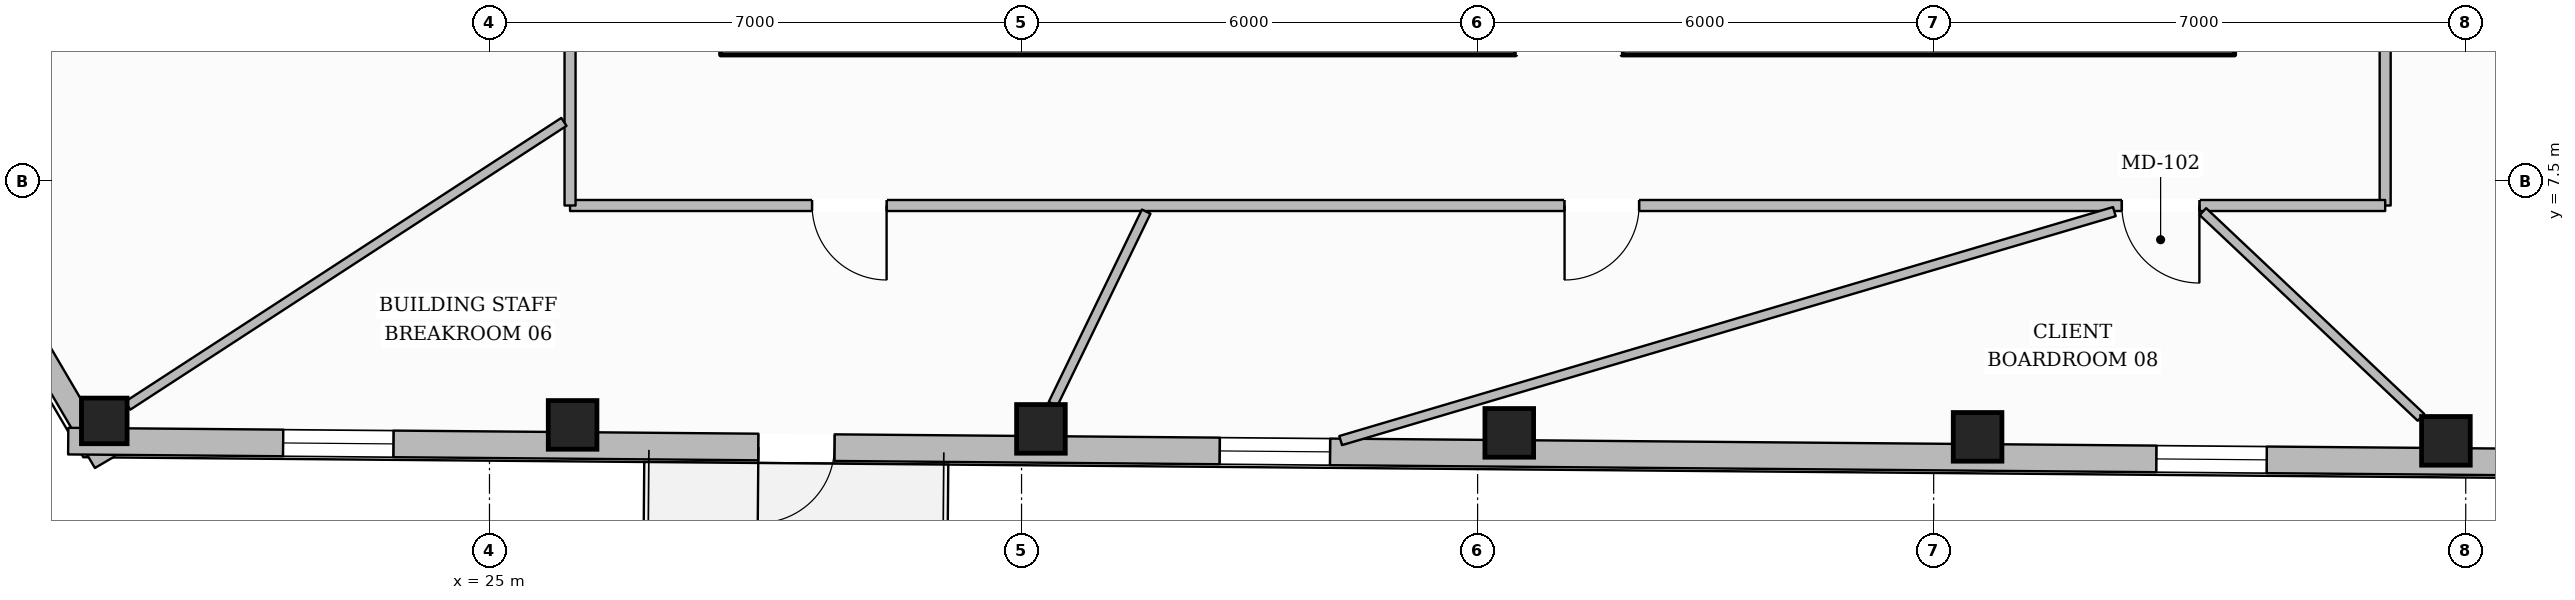
"""IFC4 building model, lengths in metres.
Left out: names, types, materials, properties, quantities, classifications, styles, units other than length and angle.
Written with IfcOpenShell. Run it as: python <this file> out.ifc"""

import sys

from ifc_helpers import new_model, si_unit, direction, frame, frame_2d, origin, origin_2d, place, context, subcontext, project, spatial, rectangle, hollow_rectangle, extrude, element, fill, save


model = new_model("IFC4")
c1 = context("Model", 3, precision=1e-05, world=origin(), true_north=direction((0.0, 1.0)))
c2 = subcontext(c1, "Body", "Model", "MODEL_VIEW")
j1 = project(units=[si_unit("LENGTHUNIT", "METRE"), si_unit("PLANEANGLEUNIT", "RADIAN")], contexts=[c1])
p1 = place(None, origin())
s1 = spatial("IfcSite", under=j1, at=p1, CompositionType="ELEMENT")
p2 = place(p1, origin())
s2 = spatial("IfcBuilding", under=s1, at=p2, CompositionType="ELEMENT")
p3 = place(p2, frame((0.0, 0.0, 191.95)))
s3 = spatial("IfcBuildingStorey", under=s2, at=p3, CompositionType="ELEMENT", Elevation=191.95)
p4 = place(p3, frame((28.04, 9.38, 0.0), z_axis=(0.0, 0.0, 1.0), x_axis=(1.0, 0.0, 0.0)))
e1 = element("IfcWall", 1, at=p4, inside=s3, PredefinedType="SOLIDWALL", context=c2, shape_type="SweptSolid", body=[
    extrude(rectangle(XDim=19.92, YDim=0.44, at=frame_2d((9.96, 0.0))), origin(), (0.0, 0.0, 1.0), 3.6),
])
p5 = place(p4, frame((10.46, 0.0, 0.0)))
e2 = element("IfcOpeningElement", 2, at=p5, cuts=e1, PredefinedType="OPENING", context=c2, shape_type="SweptSolid", body=[
    extrude(rectangle(XDim=1.4, YDim=2.2, at=frame_2d((0.7, 1.1))), frame((0.0, 0.23, 0.0), z_axis=(0.0, -1.0, 0.0), x_axis=(1.0, 0.0, 0.0)), (0.0, 0.0, 1.0), 0.46),
])
p6 = place(p3, frame((19.932, 4.346, 0.0), z_axis=(0.0, 0.0, 1.0), x_axis=(1.0, 0.0, 0.0)))
e3 = element("IfcColumn", 3, at=p6, inside=s3, PredefinedType="COLUMN", context=c2, shape_type="SweptSolid", body=[
    extrude(hollow_rectangle(XDim=0.6, YDim=0.6, WallThickness=0.028, at=origin_2d()), origin(), (0.0, 0.0, 1.0), 3.6),
])
for number, where, z_axis, x_axis in (
    (4, (26.094, 4.294, 0.0), (0.0, 0.0, 1.0), (1.0, 0.0, 0.0)),
    (5, (32.255, 4.241, 0.0), (0.0, 0.0, 1.0), (1.0, 0.0, 0.0)),
    (6, (38.417, 4.189, 0.0), (0.0, 0.0, 1.0), (1.0, 0.0, 0.0)),
    (7, (44.578, 4.136, 0.0), (0.0, 0.0, 1.0), (1.0, 0.0, 0.0)),
    (8, (50.739, 4.084, 0.0), (0.0, 0.0, 1.0), (1.0, 0.0, 0.0)),
):
    element("IfcColumn", number, at=place(p3, frame(where, z_axis=z_axis, x_axis=x_axis)), inside=s3, PredefinedType="COLUMN", context=c2, shape_type="SweptSolid", body=[
        extrude(hollow_rectangle(XDim=0.64, YDim=0.64, WallThickness=0.028, at=origin_2d()), origin(), (0.0, 0.0, 1.0), 3.6),
    ])
p7 = place(p3, frame((19.938, 3.802, 0.0), z_axis=(0.0, 0.0, 1.0), x_axis=(-0.506326456483, 0.862341880849, 0.0)))
e9 = element("IfcWall", 9, at=p7, inside=s3, PredefinedType="STANDARD", context=c2, shape_type="SweptSolid", body=[
    extrude(rectangle(XDim=9.877, YDim=0.3, at=frame_2d((4.938, 0.0))), origin(), (0.0, 0.0, 1.0), 3.132),
])
p8 = place(p7, frame((4.414, 0.0, 0.65)))
e10 = element("IfcOpeningElement", 10, at=p8, cuts=e9, PredefinedType="OPENING", context=c2, shape_type="SweptSolid", body=[
    extrude(rectangle(XDim=1.05, YDim=1.7, at=frame_2d((0.525, 0.85))), frame((0.0, 0.16, 0.0), z_axis=(0.0, -1.0, 0.0), x_axis=(1.0, 0.0, 0.0)), (0.0, 0.0, 1.0), 0.32),
])
p9 = place(p3, frame((57.379, 3.757, 0.0), z_axis=(0.0, 0.0, 1.0), x_axis=(-0.999963726544, 0.008517370208, 0.0)))
e11 = element("IfcWall", 11, at=p9, inside=s3, PredefinedType="STANDARD", context=c2, shape_type="SweptSolid", body=[
    extrude(rectangle(XDim=37.922, YDim=0.35, at=frame_2d((18.961, 0.0))), origin(), (0.0, 0.0, 1.0), 3.132),
])
p10 = place(p9, frame((27.842, 0.0, 0.0)))
e12 = element("IfcOpeningElement", 12, at=p10, cuts=e11, PredefinedType="OPENING", context=c2, shape_type="SweptSolid", body=[
    extrude(rectangle(XDim=1.0, YDim=2.2, at=frame_2d((0.5, 1.1))), frame((0.0, 0.185, 0.0), z_axis=(0.0, -1.0, 0.0), x_axis=(1.0, 0.0, 0.0)), (0.0, 0.0, 1.0), 0.37),
])
p11 = place(p9, frame((33.644, 0.0, 0.65)))
e13 = element("IfcOpeningElement", 13, at=p11, cuts=e11, PredefinedType="OPENING", context=c2, shape_type="SweptSolid", body=[
    extrude(rectangle(XDim=1.45, YDim=1.75, at=frame_2d((0.725, 0.875))), frame((0.0, 0.185, 0.0), z_axis=(0.0, -1.0, 0.0), x_axis=(1.0, 0.0, 0.0)), (0.0, 0.0, 1.0), 0.37),
])
p12 = place(p9, frame((21.321, 0.0, 0.65)))
e14 = element("IfcOpeningElement", 14, at=p12, cuts=e11, PredefinedType="OPENING", context=c2, shape_type="SweptSolid", body=[
    extrude(rectangle(XDim=1.45, YDim=1.75, at=frame_2d((0.725, 0.875))), frame((0.0, 0.185, 0.0), z_axis=(0.0, -1.0, 0.0), x_axis=(1.0, 0.0, 0.0)), (0.0, 0.0, 1.0), 0.37),
])
p13 = place(p9, frame((8.998, 0.0, 0.65)))
e15 = element("IfcOpeningElement", 15, at=p13, cuts=e11, PredefinedType="OPENING", context=c2, shape_type="SweptSolid", body=[
    extrude(rectangle(XDim=1.45, YDim=1.75, at=frame_2d((0.725, 0.875))), frame((0.0, 0.185, 0.0), z_axis=(0.0, -1.0, 0.0), x_axis=(1.0, 0.0, 0.0)), (0.0, 0.0, 1.0), 0.37),
])
p14 = place(p9, frame((2.836, 0.0, 0.65)))
e16 = element("IfcOpeningElement", 16, at=p14, cuts=e11, PredefinedType="OPENING", context=c2, shape_type="SweptSolid", body=[
    extrude(rectangle(XDim=1.45, YDim=1.75, at=frame_2d((0.725, 0.875))), frame((0.0, 0.185, 0.0), z_axis=(0.0, -1.0, 0.0), x_axis=(1.0, 0.0, 0.0)), (0.0, 0.0, 1.0), 0.37),
])
p15 = place(p3, frame((49.94, 15.1, 0.0), z_axis=(0.0, 0.0, 1.0), x_axis=(0.0, -1.0, 0.0)))
e17 = element("IfcWall", 17, at=p15, inside=s3, PredefinedType="PARTITIONING", context=c2, shape_type="SweptSolid", body=[
    extrude(rectangle(XDim=7.92, YDim=0.145, at=frame_2d((3.96, 0.0))), origin(), (0.0, 0.0, 1.0), 3.6),
])
p16 = place(p15, frame((3.26, 0.0, 0.0)))
e18 = element("IfcOpeningElement", 18, at=p16, cuts=e17, PredefinedType="OPENING", context=c2, shape_type="SweptSolid", body=[
    extrude(rectangle(XDim=1.4, YDim=2.2, at=frame_2d((0.7, 1.1))), frame((0.0, 0.083, 0.0), z_axis=(0.0, -1.0, 0.0), x_axis=(1.0, 0.0, 0.0)), (0.0, 0.0, 1.0), 0.165),
])
p17 = place(p3, frame((49.94, 7.18, 0.0), z_axis=(0.0, 0.0, 1.0), x_axis=(-1.0, 0.0, 0.0)))
e19 = element("IfcWall", 19, at=p17, inside=s3, PredefinedType="PARTITIONING", context=c2, shape_type="SweptSolid", body=[
    extrude(rectangle(XDim=23.88, YDim=0.145, at=frame_2d((11.94, 0.0))), origin(), (0.0, 0.0, 1.0), 3.6),
])
p18 = place(p17, frame((19.715, 0.0, 0.0)))
e20 = element("IfcOpeningElement", 20, at=p18, cuts=e19, PredefinedType="OPENING", context=c2, shape_type="SweptSolid", body=[
    extrude(rectangle(XDim=0.98, YDim=2.15, at=frame_2d((0.49, 1.075))), frame((0.0, 0.083, 0.0), z_axis=(0.0, -1.0, 0.0), x_axis=(1.0, 0.0, 0.0)), (0.0, 0.0, 1.0), 0.165),
])
p19 = place(p17, frame((9.816, 0.0, 0.0)))
e21 = element("IfcOpeningElement", 21, at=p19, cuts=e19, PredefinedType="OPENING", context=c2, shape_type="SweptSolid", body=[
    extrude(rectangle(XDim=0.98, YDim=2.15, at=frame_2d((0.49, 1.075))), frame((0.0, 0.083, 0.0), z_axis=(0.0, -1.0, 0.0), x_axis=(1.0, 0.0, 0.0)), (0.0, 0.0, 1.0), 0.165),
])
p20 = place(p17, frame((2.444, 0.0, 0.0)))
e22 = element("IfcOpeningElement", 22, at=p20, cuts=e19, PredefinedType="OPENING", context=c2, shape_type="SweptSolid", body=[
    extrude(rectangle(XDim=1.02, YDim=2.15, at=frame_2d((0.51, 1.075))), frame((0.0, 0.083, 0.0), z_axis=(0.0, -1.0, 0.0), x_axis=(1.0, 0.0, 0.0)), (0.0, 0.0, 1.0), 0.165),
])
p21 = place(p3, frame((26.06, 7.18, 0.0), z_axis=(0.0, 0.0, 1.0), x_axis=(0.0, 1.0, 0.0)))
e23 = element("IfcWall", 23, at=p21, inside=s3, PredefinedType="PARTITIONING", context=c2, shape_type="SweptSolid", body=[
    extrude(rectangle(XDim=4.97, YDim=0.145, at=frame_2d((2.485, 0.0))), origin(), (0.0, 0.0, 1.0), 3.6),
])
p22 = place(p21, frame((2.273, 0.0, 0.0)))
e24 = element("IfcOpeningElement", 24, at=p22, cuts=e23, PredefinedType="OPENING", context=c2, shape_type="SweptSolid", body=[
    extrude(rectangle(XDim=1.4, YDim=2.2, at=frame_2d((0.7, 1.1))), frame((0.0, 0.083, 0.0), z_axis=(0.0, -1.0, 0.0), x_axis=(1.0, 0.0, 0.0)), (0.0, 0.0, 1.0), 0.165),
])
p23 = place(p3, frame((25.979, 8.28, 0.0), z_axis=(0.0, 0.0, 1.0), x_axis=(-0.838234999643, -0.545309164946, 0.0)))
e25 = element("IfcWall", 25, at=p23, inside=s3, PredefinedType="PARTITIONING", context=c2, shape_type="SweptSolid", body=[
    extrude(rectangle(XDim=6.847, YDim=0.125, at=frame_2d((3.423, 0.0))), origin(), (0.0, 0.0, 1.0), 3.141),
])
p24 = place(p3, frame((33.64, 7.1, 0.0), z_axis=(0.0, 0.0, 1.0), x_axis=(-0.435960320496, -0.899965887661, 0.0)))
e26 = element("IfcWall", 26, at=p24, inside=s3, PredefinedType="PARTITIONING", context=c2, shape_type="SweptSolid", body=[
    extrude(rectangle(XDim=2.812, YDim=0.125, at=frame_2d((1.406, 0.0))), origin(), (0.0, 0.0, 1.0), 3.6),
])
p25 = place(p3, frame((47.542, 7.1, 0.0), z_axis=(0.0, 0.0, 1.0), x_axis=(0.727449032528, -0.68616171933, 0.0)))
e27 = element("IfcWall", 27, at=p25, inside=s3, PredefinedType="PARTITIONING", context=c2, shape_type="SweptSolid", body=[
    extrude(rectangle(XDim=3.944, YDim=0.125, at=frame_2d((1.972, 0.0))), origin(), (0.0, 0.0, 1.0), 3.6),
])
p26 = place(p3, frame((36.198, 4.088, 0.0), z_axis=(0.0, 0.0, 1.0), x_axis=(0.958899447114, 0.283746101867, 0.0)))
e28 = element("IfcWall", 28, at=p26, inside=s3, PredefinedType="PARTITIONING", context=c2, shape_type="SweptSolid", body=[
    extrude(rectangle(XDim=10.615, YDim=0.125, at=frame_2d((5.308, 0.0))), origin(), (0.0, 0.0, 1.0), 3.135),
])
p27 = place(p10, origin())
e29 = element("IfcDoor", 29, at=p27, inside=s3, OperationType="SINGLE_SWING_RIGHT", PredefinedType="DOOR", context=c2, shape_type="SweptSolid", body=[
    extrude(rectangle(XDim=1.0, YDim=2.2, at=frame_2d((0.5, 1.1))), frame((0.0, 0.025, 0.0), z_axis=(0.0, -1.0, 0.0), x_axis=(1.0, 0.0, 0.0)), (0.0, 0.0, 1.0), 0.05),
])
fill(e12, e29)
p28 = place(p11, origin())
e30 = element("IfcWindow", 30, at=p28, inside=s3, PartitioningType="SINGLE_PANEL", PredefinedType="WINDOW", context=c2, shape_type="SweptSolid", body=[
    extrude(rectangle(XDim=1.45, YDim=1.75, at=frame_2d((0.725, 0.875))), frame((0.0, 0.03, 0.0), z_axis=(0.0, -1.0, 0.0), x_axis=(1.0, 0.0, 0.0)), (0.0, 0.0, 1.0), 0.06),
])
fill(e13, e30)
p29 = place(p12, origin())
e31 = element("IfcWindow", 31, at=p29, inside=s3, PartitioningType="SINGLE_PANEL", PredefinedType="WINDOW", context=c2, shape_type="SweptSolid", body=[
    extrude(rectangle(XDim=1.45, YDim=1.75, at=frame_2d((0.725, 0.875))), frame((0.0, 0.03, 0.0), z_axis=(0.0, -1.0, 0.0), x_axis=(1.0, 0.0, 0.0)), (0.0, 0.0, 1.0), 0.06),
])
fill(e14, e31)
p30 = place(p13, origin())
e32 = element("IfcWindow", 32, at=p30, inside=s3, PartitioningType="SINGLE_PANEL", PredefinedType="WINDOW", context=c2, shape_type="SweptSolid", body=[
    extrude(rectangle(XDim=1.45, YDim=1.75, at=frame_2d((0.725, 0.875))), frame((0.0, 0.03, 0.0), z_axis=(0.0, -1.0, 0.0), x_axis=(1.0, 0.0, 0.0)), (0.0, 0.0, 1.0), 0.06),
])
fill(e15, e32)
p31 = place(p18, origin())
e33 = element("IfcDoor", 33, at=p31, inside=s3, OperationType="SINGLE_SWING_LEFT", PredefinedType="DOOR", context=c2, shape_type="SweptSolid", body=[
    extrude(rectangle(XDim=0.98, YDim=2.15, at=frame_2d((0.49, 1.075))), frame((0.0, 0.025, 0.0), z_axis=(0.0, -1.0, 0.0), x_axis=(1.0, 0.0, 0.0)), (0.0, 0.0, 1.0), 0.05),
])
fill(e20, e33)
p32 = place(p19, origin())
e34 = element("IfcDoor", 34, at=p32, inside=s3, OperationType="SINGLE_SWING_RIGHT", PredefinedType="DOOR", context=c2, shape_type="SweptSolid", body=[
    extrude(rectangle(XDim=0.98, YDim=2.15, at=frame_2d((0.49, 1.075))), frame((0.0, 0.025, 0.0), z_axis=(0.0, -1.0, 0.0), x_axis=(1.0, 0.0, 0.0)), (0.0, 0.0, 1.0), 0.05),
])
fill(e21, e34)
p33 = place(p20, origin())
e35 = element("IfcDoor", 35, at=p33, inside=s3, OperationType="SINGLE_SWING_LEFT", PredefinedType="DOOR", context=c2, shape_type="SweptSolid", body=[
    extrude(rectangle(XDim=1.02, YDim=2.15, at=frame_2d((0.51, 1.075))), frame((0.0, 0.025, 0.0), z_axis=(0.0, -1.0, 0.0), x_axis=(1.0, 0.0, 0.0)), (0.0, 0.0, 1.0), 0.05),
])
fill(e22, e35)
save(model, sys.argv[1])
